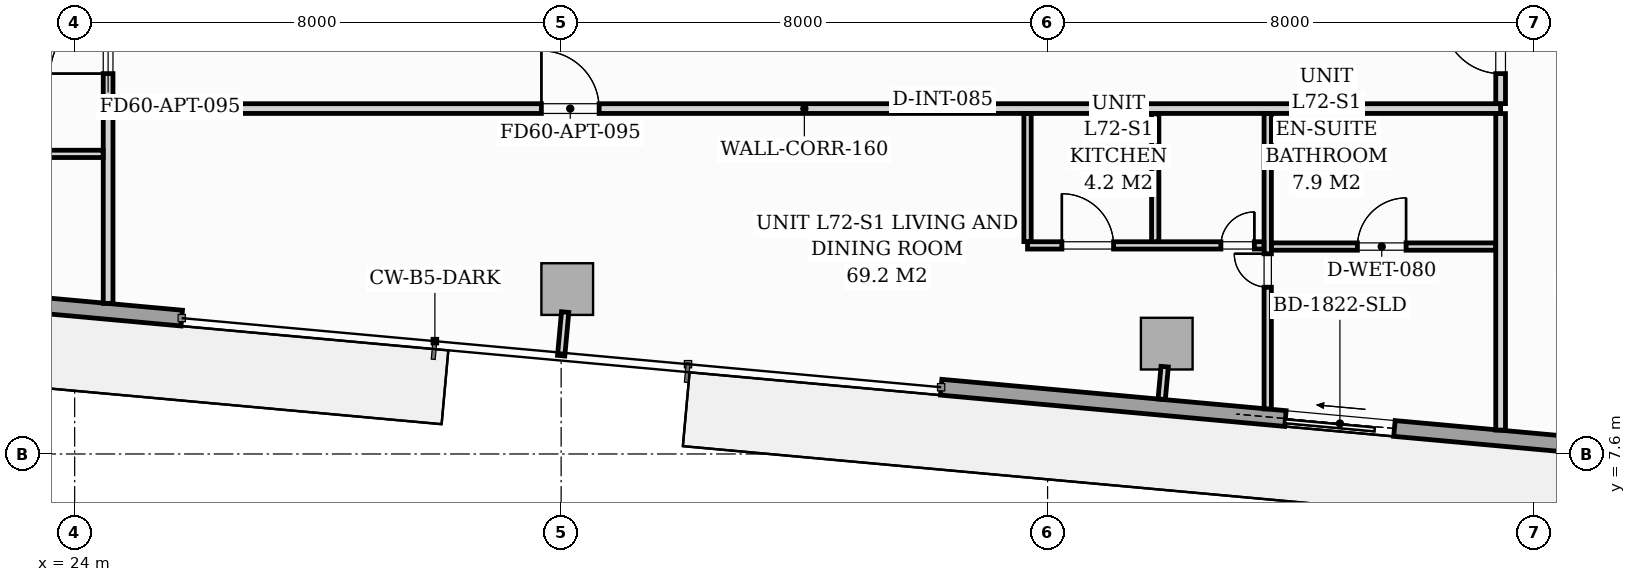
"""IFC4 building model, lengths in metres.
Left out: names, types, materials, properties, quantities, classifications, styles, units other than length and angle.
Written with IfcOpenShell. Run it as: python <this file> out.ifc"""

import sys

from ifc_helpers import new_model, si_unit, direction, frame, frame_2d, origin, origin_2d, place, context, subcontext, project, spatial, rectangle, extrude, source, transform, mapped, element, fill, save


model = new_model("IFC4")
c1 = context("Model", 3, precision=1e-05, world=origin(), true_north=direction((0.0, 1.0)))
c2 = subcontext(c1, "Body", "Model", "MODEL_VIEW")
j1 = project(units=[si_unit("LENGTHUNIT", "METRE"), si_unit("PLANEANGLEUNIT", "RADIAN")], contexts=[c1])
p1 = place(None, origin())
s1 = spatial("IfcSite", under=j1, at=p1, CompositionType="ELEMENT")
p2 = place(p1, origin())
s2 = spatial("IfcBuilding", under=s1, at=p2, CompositionType="ELEMENT")
p3 = place(p2, frame((0.0, 0.0, 249.6)))
s3 = spatial("IfcBuildingStorey", under=s2, at=p3, CompositionType="ELEMENT", Elevation=249.6)
m1 = source(origin(), c2, "Body", "SweptSolid", [
    extrude(rectangle(XDim=0.85, YDim=0.85, at=origin_2d()), origin(), (0.0, 0.0, 1.0), 3.296),
])
for number, where, z_axis, x_axis in (
    (1, (32.1, 10.312, 0.002), (0.0, 0.0, 1.0), (0.996, -0.091, 0.0)),
    (2, (41.96, 9.415, 0.002), (0.0, 0.0, 1.0), (0.996, -0.091, 0.0)),
):
    element("IfcColumn", number, at=place(p3, frame(where, z_axis=z_axis, x_axis=x_axis)), inside=s3, PredefinedType="COLUMN", context=c2, shape_type="MappedRepresentation", body=[
        mapped(m1, transform((0.0, 0.0, 0.0), scale=1.0)),
    ])
p4 = place(p3, frame((52.819, 7.372, 0.0), z_axis=(0.0, 0.0, 1.0), x_axis=(-0.995884447498, 0.090632043071, 0.0)))
e3 = element("IfcWall", 3, at=p4, inside=s3, PredefinedType="STANDARD", context=c2, shape_type="SweptSolid", body=[
    extrude(rectangle(XDim=14.63, YDim=0.26, at=frame_2d((7.315, 0.0))), origin(), (0.0, 0.0, 1.0), 3.04),
])
p5 = place(p4, frame((7.145, 0.0, 0.0)))
e4 = element("IfcOpeningElement", 4, at=p5, cuts=e3, PredefinedType="OPENING", context=c2, shape_type="SweptSolid", body=[
    extrude(rectangle(XDim=1.8, YDim=2.06, at=frame_2d((0.9, 1.03))), frame((0.0, 0.14, 0.0), z_axis=(0.0, -1.0, 0.0), x_axis=(1.0, 0.0, 0.0)), (0.0, 0.0, 1.0), 0.28),
])
p6 = place(p4, frame((2.5, 0.0, 0.65)))
e5 = element("IfcOpeningElement", 5, at=p6, cuts=e3, PredefinedType="OPENING", context=c2, shape_type="SweptSolid", body=[
    extrude(rectangle(XDim=1.6, YDim=1.5, at=frame_2d((0.8, 0.75))), frame((0.0, 0.14, 0.0), z_axis=(0.0, -1.0, 0.0), x_axis=(1.0, 0.0, 0.0)), (0.0, 0.0, 1.0), 0.28),
])
p7 = place(p3, frame((25.761, 9.834, 0.0), z_axis=(0.0, 0.0, 1.0), x_axis=(-0.995884584572, 0.090630536861, 0.0)))
e6 = element("IfcWall", 6, at=p7, inside=s3, PredefinedType="STANDARD", context=c2, shape_type="SweptSolid", body=[
    extrude(rectangle(XDim=14.63, YDim=0.26, at=frame_2d((7.315, 0.0))), origin(), (0.0, 0.0, 1.0), 3.04),
])
p8 = place(p7, frame((6.09, 0.0, 0.0)))
e7 = element("IfcOpeningElement", 7, at=p8, cuts=e6, PredefinedType="OPENING", context=c2, shape_type="SweptSolid", body=[
    extrude(rectangle(XDim=1.8, YDim=2.06, at=frame_2d((0.9, 1.03))), frame((0.0, 0.14, 0.0), z_axis=(0.0, -1.0, 0.0), x_axis=(1.0, 0.0, 0.0)), (0.0, 0.0, 1.0), 0.28),
])
p9 = place(p7, frame((8.35, 0.0, 0.65)))
e8 = element("IfcOpeningElement", 8, at=p9, cuts=e6, PredefinedType="OPENING", context=c2, shape_type="SweptSolid", body=[
    extrude(rectangle(XDim=1.6, YDim=1.5, at=frame_2d((0.8, 0.75))), frame((0.0, 0.14, 0.0), z_axis=(0.0, -1.0, 0.0), x_axis=(1.0, 0.0, 0.0)), (0.0, 0.0, 1.0), 0.28),
])
p10 = place(p3, frame((24.55, 13.28, 0.0), z_axis=(0.0, 0.0, 1.0), x_axis=(1.0, 0.0, 0.0)))
e9 = element("IfcWall", 9, at=p10, inside=s3, PredefinedType="PARTITIONING", context=c2, shape_type="SweptSolid", body=[
    extrude(rectangle(XDim=22.9, YDim=0.16, at=frame_2d((11.45, 0.0))), origin(), (0.0, 0.0, 1.0), 2.596),
])
p11 = place(p10, frame((7.125, 0.0, 0.0)))
e10 = element("IfcOpeningElement", 10, at=p11, cuts=e9, PredefinedType="OPENING", context=c2, shape_type="SweptSolid", body=[
    extrude(rectangle(XDim=0.95, YDim=2.06, at=frame_2d((0.475, 1.03))), frame((0.0, 0.09, 0.0), z_axis=(0.0, -1.0, 0.0), x_axis=(1.0, 0.0, 0.0)), (0.0, 0.0, 1.0), 0.18),
])
p12 = place(p3, frame((24.55, 10.077, 0.0), z_axis=(0.0, 0.0, 1.0), x_axis=(0.0, 1.0, 0.0)))
e11 = element("IfcWall", 11, at=p12, inside=s3, PredefinedType="PARTITIONING", context=c2, shape_type="SweptSolid", body=[
    extrude(rectangle(XDim=3.121, YDim=0.16, at=frame_2d((1.561, 0.0))), origin(), (0.0, 0.0, 1.0), 3.04),
])
p13 = place(p3, frame((24.55, 13.362, 0.0), z_axis=(0.0, 0.0, 1.0), x_axis=(0.0, 1.0, 0.0)))
e12 = element("IfcWall", 12, at=p13, inside=s3, PredefinedType="PARTITIONING", context=c2, shape_type="SweptSolid", body=[
    extrude(rectangle(XDim=7.288, YDim=0.16, at=frame_2d((3.644, 0.0))), origin(), (0.0, 0.0, 1.0), 3.04),
])
p14 = place(p13, frame((0.493, 0.0, 0.0)))
e13 = element("IfcOpeningElement", 13, at=p14, cuts=e12, PredefinedType="OPENING", context=c2, shape_type="SweptSolid", body=[
    extrude(rectangle(XDim=0.95, YDim=2.06, at=frame_2d((0.475, 1.03))), frame((0.0, 0.09, 0.0), z_axis=(0.0, -1.0, 0.0), x_axis=(1.0, 0.0, 0.0)), (0.0, 0.0, 1.0), 0.18),
])
p15 = place(p13, frame((5.623, 0.0, 0.0)))
e14 = element("IfcOpeningElement", 14, at=p15, cuts=e12, PredefinedType="OPENING", context=c2, shape_type="SweptSolid", body=[
    extrude(rectangle(XDim=0.95, YDim=2.06, at=frame_2d((0.475, 1.03))), frame((0.0, 0.09, 0.0), z_axis=(0.0, -1.0, 0.0), x_axis=(1.0, 0.0, 0.0)), (0.0, 0.0, 1.0), 0.18),
])
p16 = place(p3, frame((47.45, 7.993, 0.0), z_axis=(0.0, 0.0, 1.0), x_axis=(0.0, 1.0, 0.0)))
e15 = element("IfcWall", 15, at=p16, inside=s3, PredefinedType="PARTITIONING", context=c2, shape_type="SweptSolid", body=[
    extrude(rectangle(XDim=5.205, YDim=0.16, at=frame_2d((2.603, 0.0))), origin(), (0.0, 0.0, 1.0), 3.04),
])
p17 = place(p3, frame((47.45, 13.362, 0.0), z_axis=(0.0, 0.0, 1.0), x_axis=(0.0, 1.0, 0.0)))
e16 = element("IfcWall", 16, at=p17, inside=s3, PredefinedType="PARTITIONING", context=c2, shape_type="SweptSolid", body=[
    extrude(rectangle(XDim=7.288, YDim=0.16, at=frame_2d((3.644, 0.0))), origin(), (0.0, 0.0, 1.0), 3.04),
])
p18 = place(p17, frame((0.493, 0.0, 0.0)))
e17 = element("IfcOpeningElement", 17, at=p18, cuts=e16, PredefinedType="OPENING", context=c2, shape_type="SweptSolid", body=[
    extrude(rectangle(XDim=0.95, YDim=2.06, at=frame_2d((0.475, 1.03))), frame((0.0, 0.09, 0.0), z_axis=(0.0, -1.0, 0.0), x_axis=(1.0, 0.0, 0.0)), (0.0, 0.0, 1.0), 0.18),
])
p19 = place(p17, frame((5.681, 0.0, 0.0)))
e18 = element("IfcOpeningElement", 18, at=p19, cuts=e16, PredefinedType="OPENING", context=c2, shape_type="SweptSolid", body=[
    extrude(rectangle(XDim=0.95, YDim=2.06, at=frame_2d((0.475, 1.03))), frame((0.0, 0.09, 0.0), z_axis=(0.0, -1.0, 0.0), x_axis=(1.0, 0.0, 0.0)), (0.0, 0.0, 1.0), 0.18),
])
p20 = place(p3, frame((43.62, 8.342, 0.0), z_axis=(0.0, 0.0, 1.0), x_axis=(0.0, 1.0, 0.0)))
e19 = element("IfcWall", 19, at=p20, inside=s3, PredefinedType="PARTITIONING", context=c2, shape_type="SweptSolid", body=[
    extrude(rectangle(XDim=4.856, YDim=0.12, at=frame_2d((2.428, 0.0))), origin(), (0.0, 0.0, 1.0), 3.04),
])
p21 = place(p20, frame((2.0, 0.0, 0.0)))
e20 = element("IfcOpeningElement", 20, at=p21, cuts=e19, PredefinedType="OPENING", context=c2, shape_type="SweptSolid", body=[
    extrude(rectangle(XDim=0.55, YDim=2.0, at=frame_2d((0.275, 1.0))), frame((0.0, 0.07, 0.0), z_axis=(0.0, -1.0, 0.0), x_axis=(1.0, 0.0, 0.0)), (0.0, 0.0, 1.0), 0.14),
])
p22 = place(p3, frame((39.67, 11.03, 0.0), z_axis=(0.0, 0.0, 1.0), x_axis=(1.0, 0.0, 0.0)))
e21 = element("IfcWall", 21, at=p22, inside=s3, PredefinedType="PARTITIONING", context=c2, shape_type="SweptSolid", body=[
    extrude(rectangle(XDim=3.888, YDim=0.12, at=frame_2d((1.944, 0.0))), origin(), (0.0, 0.0, 1.0), 3.04),
])
p23 = place(p22, frame((0.565, 0.0, 0.0)))
e22 = element("IfcOpeningElement", 22, at=p23, cuts=e21, PredefinedType="OPENING", context=c2, shape_type="SweptSolid", body=[
    extrude(rectangle(XDim=0.85, YDim=2.05, at=frame_2d((0.425, 1.025))), frame((0.0, 0.07, 0.0), z_axis=(0.0, -1.0, 0.0), x_axis=(1.0, 0.0, 0.0)), (0.0, 0.0, 1.0), 0.14),
])
p24 = place(p22, frame((3.18, 0.0, 0.0)))
e23 = element("IfcOpeningElement", 23, at=p24, cuts=e21, PredefinedType="OPENING", context=c2, shape_type="SweptSolid", body=[
    extrude(rectangle(XDim=0.55, YDim=2.0, at=frame_2d((0.275, 1.0))), frame((0.0, 0.07, 0.0), z_axis=(0.0, -1.0, 0.0), x_axis=(1.0, 0.0, 0.0)), (0.0, 0.0, 1.0), 0.14),
])
for number, where, z_axis, x_axis in (
    (24, (41.77, 11.092, 0.0), (0.0, 0.0, 1.0), (0.0, 1.0, 0.0)),
    (25, (39.67, 11.092, 0.0), (0.0, 0.0, 1.0), (0.0, 1.0, 0.0)),
):
    element("IfcWall", number, at=place(p3, frame(where, z_axis=z_axis, x_axis=x_axis)), inside=s3, PredefinedType="PARTITIONING", context=c2, shape_type="SweptSolid", body=[
        extrude(rectangle(XDim=2.106, YDim=0.12, at=frame_2d((1.053, 0.0))), origin(), (0.0, 0.0, 1.0), 3.04),
    ])
p25 = place(p3, frame((43.682, 11.011, 0.0), z_axis=(0.0, 0.0, 1.0), x_axis=(1.0, 0.0, 0.0)))
e26 = element("IfcWall", 26, at=p25, inside=s3, PredefinedType="PARTITIONING", context=c2, shape_type="SweptSolid", body=[
    extrude(rectangle(XDim=3.686, YDim=0.12, at=frame_2d((1.843, 0.0))), origin(), (0.0, 0.0, 1.0), 3.04),
])
p26 = place(p25, frame((1.413, 0.0, 0.0)))
e27 = element("IfcOpeningElement", 27, at=p26, cuts=e26, PredefinedType="OPENING", context=c2, shape_type="SweptSolid", body=[
    extrude(rectangle(XDim=0.8, YDim=2.02, at=frame_2d((0.4, 1.01))), frame((0.0, 0.07, 0.0), z_axis=(0.0, -1.0, 0.0), x_axis=(1.0, 0.0, 0.0)), (0.0, 0.0, 1.0), 0.14),
])
p27 = place(p3, frame((13.643, 12.535, 0.0), z_axis=(0.0, 0.0, 1.0), x_axis=(1.0, 0.0, 0.0)))
e28 = element("IfcWall", 28, at=p27, inside=s3, PredefinedType="PARTITIONING", context=c2, shape_type="SweptSolid", body=[
    extrude(rectangle(XDim=10.825, YDim=0.12, at=frame_2d((5.413, 0.0))), origin(), (0.0, 0.0, 1.0), 3.04),
])
p28 = place(p27, frame((4.988, 0.0, 0.0)))
e29 = element("IfcOpeningElement", 29, at=p28, cuts=e28, PredefinedType="OPENING", context=c2, shape_type="SweptSolid", body=[
    extrude(rectangle(XDim=0.85, YDim=2.05, at=frame_2d((0.425, 1.025))), frame((0.0, 0.07, 0.0), z_axis=(0.0, -1.0, 0.0), x_axis=(1.0, 0.0, 0.0)), (0.0, 0.0, 1.0), 0.14),
])
p29 = place(p3, frame((32.066, 9.933, 0.0), z_axis=(0.0, 0.0, 1.0), x_axis=(-0.090872036342, -0.995862577373, 0.0)))
e30 = element("IfcWall", 30, at=p29, inside=s3, PredefinedType="PARTITIONING", context=c2, shape_type="SweptSolid", body=[
    extrude(rectangle(XDim=0.72, YDim=0.12, at=frame_2d((0.36, 0.0))), origin(), (0.0, 0.0, 1.0), 3.04),
])
p30 = place(p3, frame((41.925, 9.036, 0.0), z_axis=(0.0, 0.0, 1.0), x_axis=(-0.090740281653, -0.995874591144, 0.0)))
e31 = element("IfcWall", 31, at=p30, inside=s3, PredefinedType="PARTITIONING", context=c2, shape_type="SweptSolid", body=[
    extrude(rectangle(XDim=0.538, YDim=0.12, at=frame_2d((0.269, 0.0))), origin(), (0.0, 0.0, 1.0), 3.04),
])
m2 = source(origin(), c2, "Body", "SweptSolid", [
    extrude(rectangle(XDim=1.8, YDim=2.06, at=frame_2d((0.9, 1.03))), frame((0.0, 0.025, 0.0), z_axis=(0.0, -1.0, 0.0), x_axis=(1.0, 0.0, 0.0)), (0.0, 0.0, 1.0), 0.05),
])
p31 = place(p5, origin())
e32 = element("IfcDoor", 32, at=p31, inside=s3, OperationType="SLIDING_TO_RIGHT", PredefinedType="DOOR", context=c2, shape_type="MappedRepresentation", body=[
    mapped(m2, transform((0.0, 0.0, 0.0), scale=1.0)),
])
fill(e4, e32)
m3 = source(origin(), c2, "Body", "SweptSolid", [
    extrude(rectangle(XDim=0.8, YDim=2.02, at=frame_2d((0.4, 1.01))), frame((0.0, 0.025, 0.0), z_axis=(0.0, -1.0, 0.0), x_axis=(1.0, 0.0, 0.0)), (0.0, 0.0, 1.0), 0.05),
])
p32 = place(p26, origin())
e33 = element("IfcDoor", 33, at=p32, inside=s3, OperationType="SINGLE_SWING_RIGHT", PredefinedType="DOOR", context=c2, shape_type="MappedRepresentation", body=[
    mapped(m3, transform((0.0, 0.0, 0.0), scale=1.0)),
])
fill(e27, e33)
m4 = source(origin(), c2, "Body", "SweptSolid", [
    extrude(rectangle(XDim=0.95, YDim=2.06, at=frame_2d((0.475, 1.03))), frame((0.0, 0.025, 0.0), z_axis=(0.0, -1.0, 0.0), x_axis=(1.0, 0.0, 0.0)), (0.0, 0.0, 1.0), 0.05),
])
p33 = place(p11, origin())
e34 = element("IfcDoor", 34, at=p33, inside=s3, OperationType="SINGLE_SWING_LEFT", PredefinedType="DOOR", context=c2, shape_type="MappedRepresentation", body=[
    mapped(m4, transform((0.0, 0.0, 0.0), scale=1.0)),
])
fill(e10, e34)
m5 = source(origin(), c2, "Body", "SweptSolid", [
    extrude(rectangle(XDim=0.55, YDim=2.0, at=frame_2d((0.275, 1.0))), frame((0.0, 0.025, 0.0), z_axis=(0.0, -1.0, 0.0), x_axis=(1.0, 0.0, 0.0)), (0.0, 0.0, 1.0), 0.05),
])
p34 = place(p21, origin())
e35 = element("IfcDoor", 35, at=p34, inside=s3, OperationType="SINGLE_SWING_RIGHT", PredefinedType="DOOR", context=c2, shape_type="MappedRepresentation", body=[
    mapped(m5, transform((0.0, 0.0, 0.0), scale=1.0)),
])
fill(e20, e35)
m6 = source(origin(), c2, "Body", "SweptSolid", [
    extrude(rectangle(XDim=0.85, YDim=2.05, at=frame_2d((0.425, 1.025))), frame((0.0, 0.025, 0.0), z_axis=(0.0, -1.0, 0.0), x_axis=(1.0, 0.0, 0.0)), (0.0, 0.0, 1.0), 0.05),
])
p35 = place(p23, origin())
e36 = element("IfcDoor", 36, at=p35, inside=s3, OperationType="SINGLE_SWING_LEFT", PredefinedType="DOOR", context=c2, shape_type="MappedRepresentation", body=[
    mapped(m6, transform((0.0, 0.0, 0.0), scale=1.0)),
])
fill(e22, e36)
p36 = place(p24, origin())
e37 = element("IfcDoor", 37, at=p36, inside=s3, OperationType="SINGLE_SWING_RIGHT", PredefinedType="DOOR", context=c2, shape_type="MappedRepresentation", body=[
    mapped(m5, transform((0.0, 0.0, 0.0), scale=1.0)),
])
fill(e23, e37)
p37 = place(p14, origin())
e38 = element("IfcDoor", 38, at=p37, inside=s3, OperationType="SINGLE_SWING_LEFT", PredefinedType="DOOR", context=c2, shape_type="MappedRepresentation", body=[
    mapped(m4, transform((0.0, 0.0, 0.0), scale=1.0)),
])
fill(e13, e38)
p38 = place(p18, origin())
e39 = element("IfcDoor", 39, at=p38, inside=s3, OperationType="SINGLE_SWING_RIGHT", PredefinedType="DOOR", context=c2, shape_type="MappedRepresentation", body=[
    mapped(m4, transform((0.0, 0.0, 0.0), scale=1.0)),
])
fill(e17, e39)
save(model, sys.argv[1])
